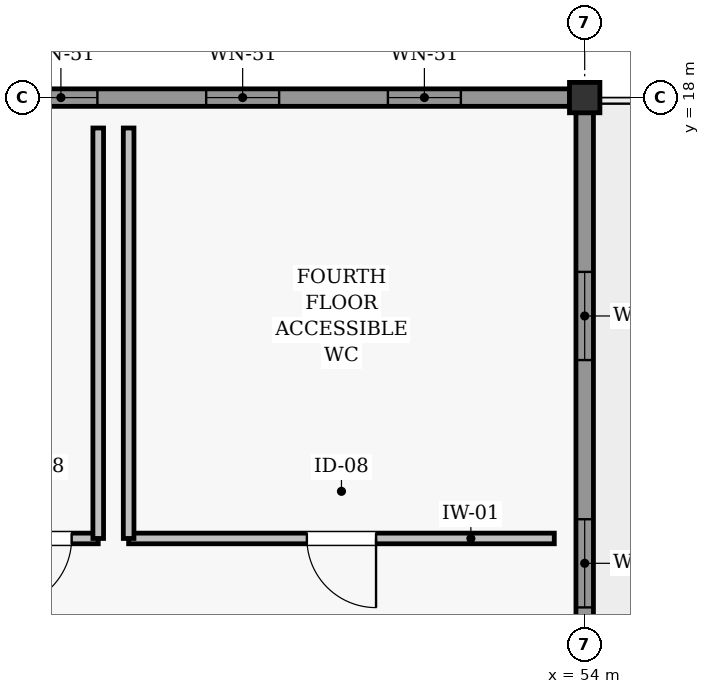
"""IFC4 building model, lengths in metres.
Left out: names, types, materials, properties, quantities, classifications, styles, units other than length and angle.
Written with IfcOpenShell. Run it as: python <this file> out.ifc"""

import sys

from ifc_helpers import new_model, si_unit, direction, frame, frame_2d, origin, origin_2d, place, context, subcontext, project, spatial, rectangle, extrude, element, fill, save


model = new_model("IFC4")
c1 = context("Model", 3, precision=1e-05, world=origin(), true_north=direction((0.0, 1.0)))
c2 = subcontext(c1, "Body", "Model", "MODEL_VIEW")
j1 = project(units=[si_unit("LENGTHUNIT", "METRE"), si_unit("PLANEANGLEUNIT", "RADIAN")], contexts=[c1])
p1 = place(None, origin())
s1 = spatial("IfcSite", under=j1, at=p1, CompositionType="ELEMENT")
p2 = place(p1, origin())
s2 = spatial("IfcBuilding", under=s1, at=p2, CompositionType="ELEMENT")
p3 = place(p2, frame((0.0, 0.0, 15.0)))
s3 = spatial("IfcBuildingStorey", under=s2, at=p3, CompositionType="ELEMENT", Elevation=15.0)
p4 = place(p3, frame((54.0, 18.0, 0.0), z_axis=(0.0, 0.0, 1.0), x_axis=(1.0, 0.0, 0.0)))
e1 = element("IfcColumn", 1, at=p4, inside=s3, PredefinedType="COLUMN", context=c2, shape_type="SweptSolid", body=[
    extrude(rectangle(XDim=0.4, YDim=0.4, at=origin_2d()), origin(), (0.0, 0.0, 1.0), 3.0),
])
p5 = place(p3, frame((45.198, 18.0, 0.0), z_axis=(0.0, 0.0, 1.0), x_axis=(1.0, 0.0, 0.0)))
e2 = element("IfcWall", 2, at=p5, inside=s3, PredefinedType="SOLIDWALL", context=c2, shape_type="SweptSolid", body=[
    extrude(rectangle(XDim=8.604, YDim=0.23, at=frame_2d((4.302, 0.0))), origin(), (0.0, 0.0, 1.0), 2.242),
])
p6 = place(p5, frame((1.431, 0.0, 0.8)))
e3 = element("IfcOpeningElement", 3, at=p6, cuts=e2, PredefinedType="OPENING", context=c2, shape_type="SweptSolid", body=[
    extrude(rectangle(XDim=0.96, YDim=1.04, at=frame_2d((0.48, 0.52))), frame((0.0, 0.125, 0.0), z_axis=(0.0, -1.0, 0.0), x_axis=(1.0, 0.0, 0.0)), (0.0, 0.0, 1.0), 0.25),
])
p7 = place(p5, frame((3.822, 0.0, 0.8)))
e4 = element("IfcOpeningElement", 4, at=p7, cuts=e2, PredefinedType="OPENING", context=c2, shape_type="SweptSolid", body=[
    extrude(rectangle(XDim=0.96, YDim=1.04, at=frame_2d((0.48, 0.52))), frame((0.0, 0.125, 0.0), z_axis=(0.0, -1.0, 0.0), x_axis=(1.0, 0.0, 0.0)), (0.0, 0.0, 1.0), 0.25),
])
p8 = place(p5, frame((6.213, 0.0, 0.8)))
e5 = element("IfcOpeningElement", 5, at=p8, cuts=e2, PredefinedType="OPENING", context=c2, shape_type="SweptSolid", body=[
    extrude(rectangle(XDim=0.96, YDim=1.04, at=frame_2d((0.48, 0.52))), frame((0.0, 0.125, 0.0), z_axis=(0.0, -1.0, 0.0), x_axis=(1.0, 0.0, 0.0)), (0.0, 0.0, 1.0), 0.25),
])
p9 = place(p3, frame((54.0, 9.198, 0.0), z_axis=(0.0, 0.0, 1.0), x_axis=(0.0, 1.0, 0.0)))
e6 = element("IfcWall", 6, at=p9, inside=s3, PredefinedType="SOLIDWALL", context=c2, shape_type="SweptSolid", body=[
    extrude(rectangle(XDim=8.604, YDim=0.23, at=frame_2d((4.302, 0.0))), origin(), (0.0, 0.0, 1.0), 2.242),
])
p10 = place(p9, frame((2.095, 0.0, 0.66)))
e7 = element("IfcOpeningElement", 7, at=p10, cuts=e6, PredefinedType="OPENING", context=c2, shape_type="SweptSolid", body=[
    extrude(rectangle(XDim=1.16, YDim=1.4, at=frame_2d((0.58, 0.7))), frame((0.0, 0.125, 0.0), z_axis=(0.0, -1.0, 0.0), x_axis=(1.0, 0.0, 0.0)), (0.0, 0.0, 1.0), 0.25),
])
p11 = place(p9, frame((5.349, 0.0, 0.66)))
e8 = element("IfcOpeningElement", 8, at=p11, cuts=e6, PredefinedType="OPENING", context=c2, shape_type="SweptSolid", body=[
    extrude(rectangle(XDim=1.16, YDim=1.4, at=frame_2d((0.58, 0.7))), frame((0.0, 0.125, 0.0), z_axis=(0.0, -1.0, 0.0), x_axis=(1.0, 0.0, 0.0)), (0.0, 0.0, 1.0), 0.25),
])
p12 = place(p3, frame((42.2, 12.2, 0.0), z_axis=(0.0, 0.0, 1.0), x_axis=(1.0, 0.0, 0.0)))
e9 = element("IfcWall", 9, at=p12, inside=s3, PredefinedType="PARTITIONING", context=c2, shape_type="SweptSolid", body=[
    extrude(rectangle(XDim=5.4, YDim=0.14, at=frame_2d((2.7, 0.0))), origin(), (0.0, 0.0, 1.0), 2.245),
])
p13 = place(p12, frame((4.14, 0.0, 0.0)))
e10 = element("IfcOpeningElement", 10, at=p13, cuts=e9, PredefinedType="OPENING", context=c2, shape_type="SweptSolid", body=[
    extrude(rectangle(XDim=0.91, YDim=2.04, at=frame_2d((0.455, 1.02))), frame((0.0, 0.08, 0.0), z_axis=(0.0, -1.0, 0.0), x_axis=(1.0, 0.0, 0.0)), (0.0, 0.0, 1.0), 0.16),
])
p14 = place(p3, frame((47.6, 12.2, 0.0), z_axis=(0.0, 0.0, 1.0), x_axis=(0.0, 1.0, 0.0)))
e11 = element("IfcWall", 11, at=p14, inside=s3, PredefinedType="PARTITIONING", context=c2, shape_type="SweptSolid", body=[
    extrude(rectangle(XDim=5.4, YDim=0.14, at=frame_2d((2.7, 0.0))), origin(), (0.0, 0.0, 1.0), 2.79),
])
p15 = place(p3, frame((48.0, 12.2, 0.0), z_axis=(0.0, 0.0, 1.0), x_axis=(1.0, 0.0, 0.0)))
e12 = element("IfcWall", 12, at=p15, inside=s3, PredefinedType="PARTITIONING", context=c2, shape_type="SweptSolid", body=[
    extrude(rectangle(XDim=5.6, YDim=0.14, at=frame_2d((2.8, 0.0))), origin(), (0.0, 0.0, 1.0), 2.79),
])
p16 = place(p15, frame((2.345, 0.0, 0.0)))
e13 = element("IfcOpeningElement", 13, at=p16, cuts=e12, PredefinedType="OPENING", context=c2, shape_type="SweptSolid", body=[
    extrude(rectangle(XDim=0.91, YDim=2.04, at=frame_2d((0.455, 1.02))), frame((0.0, 0.08, 0.0), z_axis=(0.0, -1.0, 0.0), x_axis=(1.0, 0.0, 0.0)), (0.0, 0.0, 1.0), 0.16),
])
p17 = place(p3, frame((48.0, 12.2, 0.0), z_axis=(0.0, 0.0, 1.0), x_axis=(0.0, 1.0, 0.0)))
e14 = element("IfcWall", 14, at=p17, inside=s3, PredefinedType="PARTITIONING", context=c2, shape_type="SweptSolid", body=[
    extrude(rectangle(XDim=5.4, YDim=0.14, at=frame_2d((2.7, 0.0))), origin(), (0.0, 0.0, 1.0), 2.79),
])
p18 = place(p6, origin())
e15 = element("IfcWindow", 15, at=p18, inside=s3, PartitioningType="SINGLE_PANEL", PredefinedType="WINDOW", context=c2, shape_type="SweptSolid", body=[
    extrude(rectangle(XDim=0.96, YDim=1.04, at=frame_2d((0.48, 0.52))), frame((0.0, 0.03, 0.0), z_axis=(0.0, -1.0, 0.0), x_axis=(1.0, 0.0, 0.0)), (0.0, 0.0, 1.0), 0.06),
])
fill(e3, e15)
p19 = place(p7, origin())
e16 = element("IfcWindow", 16, at=p19, inside=s3, PartitioningType="SINGLE_PANEL", PredefinedType="WINDOW", context=c2, shape_type="SweptSolid", body=[
    extrude(rectangle(XDim=0.96, YDim=1.04, at=frame_2d((0.48, 0.52))), frame((0.0, 0.03, 0.0), z_axis=(0.0, -1.0, 0.0), x_axis=(1.0, 0.0, 0.0)), (0.0, 0.0, 1.0), 0.06),
])
fill(e4, e16)
p20 = place(p8, origin())
e17 = element("IfcWindow", 17, at=p20, inside=s3, PartitioningType="SINGLE_PANEL", PredefinedType="WINDOW", context=c2, shape_type="SweptSolid", body=[
    extrude(rectangle(XDim=0.96, YDim=1.04, at=frame_2d((0.48, 0.52))), frame((0.0, 0.03, 0.0), z_axis=(0.0, -1.0, 0.0), x_axis=(1.0, 0.0, 0.0)), (0.0, 0.0, 1.0), 0.06),
])
fill(e5, e17)
p21 = place(p10, origin())
e18 = element("IfcWindow", 18, at=p21, inside=s3, PartitioningType="SINGLE_PANEL", PredefinedType="WINDOW", context=c2, shape_type="SweptSolid", body=[
    extrude(rectangle(XDim=1.16, YDim=1.4, at=frame_2d((0.58, 0.7))), frame((0.0, 0.03, 0.0), z_axis=(0.0, -1.0, 0.0), x_axis=(1.0, 0.0, 0.0)), (0.0, 0.0, 1.0), 0.06),
])
fill(e7, e18)
p22 = place(p11, origin())
e19 = element("IfcWindow", 19, at=p22, inside=s3, PartitioningType="SINGLE_PANEL", PredefinedType="WINDOW", context=c2, shape_type="SweptSolid", body=[
    extrude(rectangle(XDim=1.16, YDim=1.4, at=frame_2d((0.58, 0.7))), frame((0.0, 0.03, 0.0), z_axis=(0.0, -1.0, 0.0), x_axis=(1.0, 0.0, 0.0)), (0.0, 0.0, 1.0), 0.06),
])
fill(e8, e19)
p23 = place(p13, frame((0.91, 0.0, 0.0), z_axis=(0.0, 0.0, 1.0), x_axis=(-1.0, 0.0, 0.0)))
e20 = element("IfcDoor", 20, at=p23, inside=s3, OperationType="SINGLE_SWING_LEFT", PredefinedType="DOOR", context=c2, shape_type="SweptSolid", body=[
    extrude(rectangle(XDim=0.91, YDim=2.04, at=frame_2d((0.455, 1.02))), frame((0.0, 0.025, 0.0), z_axis=(0.0, -1.0, 0.0), x_axis=(1.0, 0.0, 0.0)), (0.0, 0.0, 1.0), 0.05),
])
fill(e10, e20)
p24 = place(p16, frame((0.91, 0.0, 0.0), z_axis=(0.0, 0.0, 1.0), x_axis=(-1.0, 0.0, 0.0)))
e21 = element("IfcDoor", 21, at=p24, inside=s3, OperationType="SINGLE_SWING_RIGHT", PredefinedType="DOOR", context=c2, shape_type="SweptSolid", body=[
    extrude(rectangle(XDim=0.91, YDim=2.04, at=frame_2d((0.455, 1.02))), frame((0.0, 0.025, 0.0), z_axis=(0.0, -1.0, 0.0), x_axis=(1.0, 0.0, 0.0)), (0.0, 0.0, 1.0), 0.05),
])
fill(e13, e21)
save(model, sys.argv[1])
